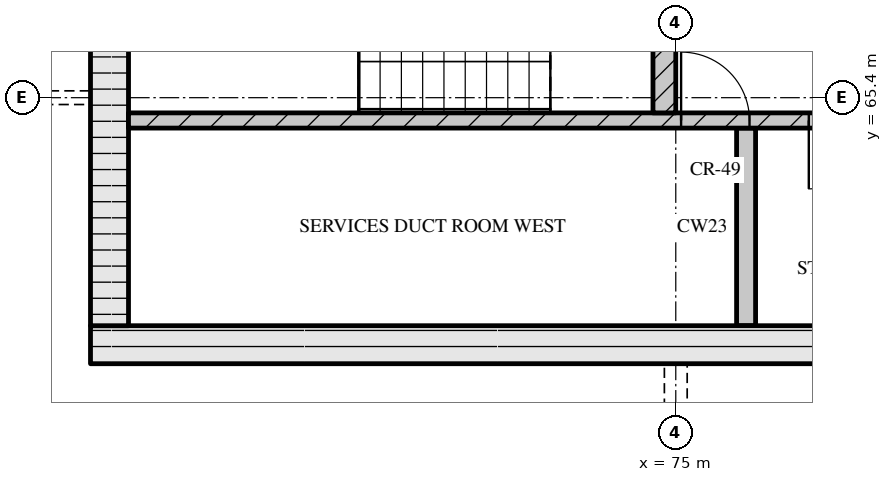
"""IFC4 building model, lengths in metres.
Left out: names, types, materials, properties, quantities, classifications, styles, units other than length and angle.
Written with IfcOpenShell. Run it as: python <this file> out.ifc"""

import sys

from ifc_helpers import new_model, si_unit, direction, frame, frame_2d, origin, place, context, subcontext, project, spatial, rectangle, extrude, element, fill, save


model = new_model("IFC4")
c1 = context("Model", 3, precision=1e-05, world=origin(), true_north=direction((0.0, 1.0)))
c2 = subcontext(c1, "Body", "Model", "MODEL_VIEW")
j1 = project(units=[si_unit("LENGTHUNIT", "METRE"), si_unit("PLANEANGLEUNIT", "RADIAN")], contexts=[c1])
p1 = place(None, origin())
s1 = spatial("IfcSite", under=j1, at=p1, CompositionType="ELEMENT")
p2 = place(p1, origin())
s2 = spatial("IfcBuilding", under=s1, at=p2, CompositionType="ELEMENT")
p3 = place(p2, frame((0.0, 0.0, 292.35)))
s3 = spatial("IfcBuildingStorey", under=s2, at=p3, CompositionType="ELEMENT", Elevation=292.35)
p4 = place(p3, frame((67.3, 62.15, 0.0), z_axis=(0.0, 0.0, 1.0), x_axis=(1.0, 0.0, 0.0)))
e1 = element("IfcWall", 1, at=p4, inside=s3, PredefinedType="SOLIDWALL", context=c2, shape_type="SweptSolid", body=[
    extrude(rectangle(XDim=40.6, YDim=0.5, at=frame_2d((20.3, 0.0))), origin(), (0.0, 0.0, 1.0), 3.32),
])
p5 = place(p4, frame((20.65, 0.0, 0.0)))
e2 = element("IfcOpeningElement", 2, at=p5, cuts=e1, PredefinedType="OPENING", context=c2, shape_type="SweptSolid", body=[
    extrude(rectangle(XDim=1.8, YDim=2.1, at=frame_2d((0.9, 1.05))), frame((0.0, 0.26, 0.0), z_axis=(0.0, -1.0, 0.0), x_axis=(1.0, 0.0, 0.0)), (0.0, 0.0, 1.0), 0.52),
])
p6 = place(p3, frame((67.55, 62.4, 0.0), z_axis=(0.0, 0.0, 1.0), x_axis=(0.0, 1.0, 0.0)))
e3 = element("IfcWall", 3, at=p6, inside=s3, PredefinedType="SOLIDWALL", context=c2, shape_type="SweptSolid", body=[
    extrude(rectangle(XDim=12.0, YDim=0.5, at=frame_2d((6.0, 0.0))), origin(), (0.0, 0.0, 1.0), 3.32),
])
p7 = place(p6, frame((6.45, 0.0, 0.0)))
e4 = element("IfcOpeningElement", 4, at=p7, cuts=e3, PredefinedType="OPENING", context=c2, shape_type="SweptSolid", body=[
    extrude(rectangle(XDim=1.2, YDim=2.1, at=frame_2d((0.6, 1.05))), frame((0.0, 0.26, 0.0), z_axis=(0.0, -1.0, 0.0), x_axis=(1.0, 0.0, 0.0)), (0.0, 0.0, 1.0), 0.52),
])
p8 = place(p3, frame((75.925, 62.4, 0.0), z_axis=(0.0, 0.0, 1.0), x_axis=(0.0, 1.0, 0.0)))
e5 = element("IfcWall", 5, at=p8, inside=s3, PredefinedType="SOLIDWALL", context=c2, shape_type="SweptSolid", body=[
    extrude(rectangle(XDim=2.6, YDim=0.25, at=frame_2d((1.3, 0.0))), origin(), (0.0, 0.0, 1.0), 3.32),
])
p9 = place(p3, frame((67.8, 65.1, 0.0), z_axis=(0.0, 0.0, 1.0), x_axis=(1.0, 0.0, 0.0)))
e6 = element("IfcWall", 6, at=p9, inside=s3, PredefinedType="SOLIDWALL", context=c2, shape_type="SweptSolid", body=[
    extrude(rectangle(XDim=18.5, YDim=0.2, at=frame_2d((9.25, 0.0))), origin(), (0.0, 0.0, 1.0), 3.32),
])
p10 = place(p9, frame((7.27, 0.0, 0.0)))
e7 = element("IfcOpeningElement", 7, at=p10, cuts=e6, PredefinedType="OPENING", context=c2, shape_type="SweptSolid", body=[
    extrude(rectangle(XDim=0.9, YDim=2.1, at=frame_2d((0.45, 1.05))), frame((0.0, 0.11, 0.0), z_axis=(0.0, -1.0, 0.0), x_axis=(1.0, 0.0, 0.0)), (0.0, 0.0, 1.0), 0.22),
])
p11 = place(p9, frame((8.95, 0.0, 0.0)))
e8 = element("IfcOpeningElement", 8, at=p11, cuts=e6, PredefinedType="OPENING", context=c2, shape_type="SweptSolid", body=[
    extrude(rectangle(XDim=0.9, YDim=2.1, at=frame_2d((0.45, 1.05))), frame((0.0, 0.11, 0.0), z_axis=(0.0, -1.0, 0.0), x_axis=(1.0, 0.0, 0.0)), (0.0, 0.0, 1.0), 0.22),
])
p12 = place(p9, frame((11.42, 0.0, 0.0)))
e9 = element("IfcOpeningElement", 9, at=p12, cuts=e6, PredefinedType="OPENING", context=c2, shape_type="SweptSolid", body=[
    extrude(rectangle(XDim=0.9, YDim=2.1, at=frame_2d((0.45, 1.05))), frame((0.0, 0.11, 0.0), z_axis=(0.0, -1.0, 0.0), x_axis=(1.0, 0.0, 0.0)), (0.0, 0.0, 1.0), 0.22),
])
p13 = place(p9, frame((13.92, 0.0, 0.0)))
e10 = element("IfcOpeningElement", 10, at=p13, cuts=e6, PredefinedType="OPENING", context=c2, shape_type="SweptSolid", body=[
    extrude(rectangle(XDim=0.9, YDim=2.1, at=frame_2d((0.45, 1.05))), frame((0.0, 0.11, 0.0), z_axis=(0.0, -1.0, 0.0), x_axis=(1.0, 0.0, 0.0)), (0.0, 0.0, 1.0), 0.22),
])
p14 = place(p9, frame((16.7, 0.0, 0.0)))
e11 = element("IfcOpeningElement", 11, at=p14, cuts=e6, PredefinedType="OPENING", context=c2, shape_type="SweptSolid", body=[
    extrude(rectangle(XDim=0.9, YDim=2.1, at=frame_2d((0.45, 1.05))), frame((0.0, 0.11, 0.0), z_axis=(0.0, -1.0, 0.0), x_axis=(1.0, 0.0, 0.0)), (0.0, 0.0, 1.0), 0.22),
])
p15 = place(p3, frame((74.85, 65.2, 0.0), z_axis=(0.0, 0.0, 1.0), x_axis=(0.0, 1.0, 0.0)))
e12 = element("IfcWall", 12, at=p15, inside=s3, PredefinedType="SOLIDWALL", context=c2, shape_type="SweptSolid", body=[
    extrude(rectangle(XDim=2.85, YDim=0.3, at=frame_2d((1.425, 0.0))), origin(), (0.0, 0.0, 1.0), 3.32),
])
p16 = place(p10, origin())
e13 = element("IfcDoor", 13, at=p16, inside=s3, OperationType="SINGLE_SWING_LEFT", PredefinedType="DOOR", context=c2, shape_type="SweptSolid", body=[
    extrude(rectangle(XDim=0.9, YDim=2.1, at=frame_2d((0.45, 1.05))), frame((0.0, 0.025, 0.0), z_axis=(0.0, -1.0, 0.0), x_axis=(1.0, 0.0, 0.0)), (0.0, 0.0, 1.0), 0.05),
])
fill(e7, e13)
p17 = place(p11, origin())
e14 = element("IfcDoor", 14, at=p17, inside=s3, OperationType="SINGLE_SWING_RIGHT", PredefinedType="DOOR", context=c2, shape_type="SweptSolid", body=[
    extrude(rectangle(XDim=0.9, YDim=2.1, at=frame_2d((0.45, 1.05))), frame((0.0, 0.025, 0.0), z_axis=(0.0, -1.0, 0.0), x_axis=(1.0, 0.0, 0.0)), (0.0, 0.0, 1.0), 0.05),
])
fill(e8, e14)
save(model, sys.argv[1])
